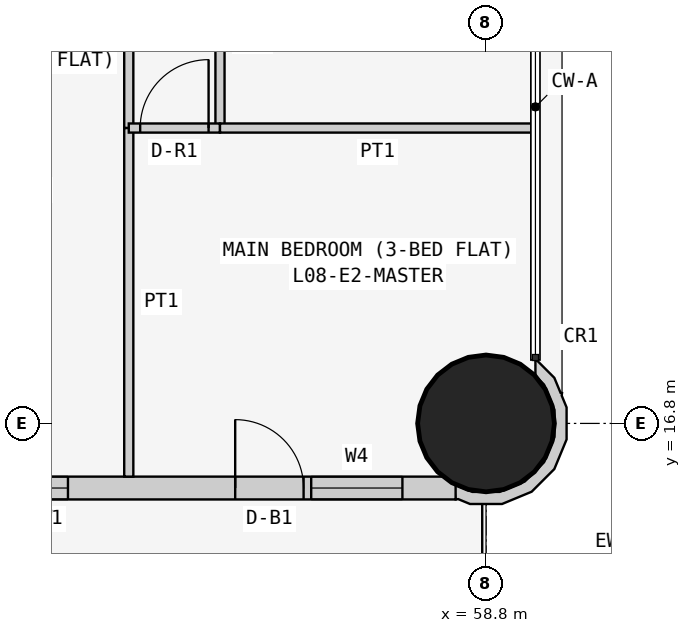
"""IFC4 building model, lengths in metres.
Left out: names, types, materials, properties, quantities, classifications, styles, units other than length and angle.
Written with IfcOpenShell. Run it as: python <this file> out.ifc"""

import sys

from ifc_helpers import new_model, si_unit, direction, frame, frame_2d, origin, origin_2d, place, context, subcontext, project, spatial, polyline, rectangle, circle, outline, extrude, element, fill, save


model = new_model("IFC4")
c1 = context("Model", 3, precision=1e-05, world=origin(), true_north=direction((0.0, 1.0)))
c2 = subcontext(c1, "Body", "Model", "MODEL_VIEW")
j1 = project(units=[si_unit("LENGTHUNIT", "METRE"), si_unit("PLANEANGLEUNIT", "RADIAN")], contexts=[c1])
p1 = place(None, origin())
s1 = spatial("IfcSite", under=j1, at=p1, CompositionType="ELEMENT")
p2 = place(p1, origin())
s2 = spatial("IfcBuilding", under=s1, at=p2, CompositionType="ELEMENT")
p3 = place(p2, frame((0.0, 0.0, 38.1)))
s3 = spatial("IfcBuildingStorey", under=s2, at=p3, CompositionType="ELEMENT", Elevation=38.1)
p4 = place(p3, frame((58.8, 16.8, 0.0), z_axis=(0.0, 0.0, 1.0), x_axis=(1.0, 0.0, 0.0)))
e1 = element("IfcColumn", 1, at=p4, inside=s3, PredefinedType="COLUMN", context=c2, shape_type="SweptSolid", body=[
    extrude(circle(Radius=0.9, at=origin_2d()), origin(), (0.0, 0.0, 1.0), 3.6),
])
p5 = place(p3, frame((43.0, 15.95, 0.0), z_axis=(0.0, 0.0, 1.0), x_axis=(1.0, 0.0, 0.0)))
e2 = element("IfcWall", 2, at=p5, inside=s3, PredefinedType="SOLIDWALL", context=c2, shape_type="SweptSolid", body=[
    extrude(rectangle(XDim=15.4, YDim=0.3, at=frame_2d((7.7, 0.0))), origin(), (0.0, 0.0, 1.0), 3.45),
])
p6 = place(p5, frame((1.2, 0.0, 0.9)))
e3 = element("IfcOpeningElement", 3, at=p6, cuts=e2, PredefinedType="OPENING", context=c2, shape_type="SweptSolid", body=[
    extrude(rectangle(XDim=1.8, YDim=1.5, at=frame_2d((0.9, 0.75))), frame((0.0, 0.16, 0.0), z_axis=(0.0, -1.0, 0.0), x_axis=(1.0, 0.0, 0.0)), (0.0, 0.0, 1.0), 0.32),
])
p7 = place(p5, frame((4.95, 0.0, 1.5)))
e4 = element("IfcOpeningElement", 4, at=p7, cuts=e2, PredefinedType="OPENING", context=c2, shape_type="SweptSolid", body=[
    extrude(rectangle(XDim=0.9, YDim=0.7, at=frame_2d((0.45, 0.35))), frame((0.0, 0.16, 0.0), z_axis=(0.0, -1.0, 0.0), x_axis=(1.0, 0.0, 0.0)), (0.0, 0.0, 1.0), 0.32),
])
p8 = place(p5, frame((8.5, 0.0, 0.9)))
e5 = element("IfcOpeningElement", 5, at=p8, cuts=e2, PredefinedType="OPENING", context=c2, shape_type="SweptSolid", body=[
    extrude(rectangle(XDim=1.8, YDim=1.5, at=frame_2d((0.9, 0.75))), frame((0.0, 0.16, 0.0), z_axis=(0.0, -1.0, 0.0), x_axis=(1.0, 0.0, 0.0)), (0.0, 0.0, 1.0), 0.32),
])
p9 = place(p5, frame((12.5, 0.0, 0.0)))
e6 = element("IfcOpeningElement", 6, at=p9, cuts=e2, PredefinedType="OPENING", context=c2, shape_type="SweptSolid", body=[
    extrude(rectangle(XDim=0.9, YDim=2.4, at=frame_2d((0.45, 1.2))), frame((0.0, 0.16, 0.0), z_axis=(0.0, -1.0, 0.0), x_axis=(1.0, 0.0, 0.0)), (0.0, 0.0, 1.0), 0.32),
])
p10 = place(p5, frame((13.5, 0.0, 0.9)))
e7 = element("IfcOpeningElement", 7, at=p10, cuts=e2, PredefinedType="OPENING", context=c2, shape_type="SweptSolid", body=[
    extrude(rectangle(XDim=1.2, YDim=1.5, at=frame_2d((0.6, 0.75))), frame((0.0, 0.16, 0.0), z_axis=(0.0, -1.0, 0.0), x_axis=(1.0, 0.0, 0.0)), (0.0, 0.0, 1.0), 0.32),
])
p11 = place(p3, frame((58.436, 15.89, 0.0), z_axis=(0.0, 0.0, 1.0), x_axis=(0.926129809145, -0.377204953059, 0.0)))
e8 = element("IfcWall", 8, at=p11, inside=s3, PredefinedType="SOLIDWALL", context=c2, shape_type="SweptSolid", body=[
    extrude(outline(polyline([(0.769, 1.728), (0.75, 1.723), (0.6, 1.875), (0.295, 2.004), (0.281, 1.998), (0.36, 1.803), (0.509, 1.741), (0.761, 1.486), (0.896, 1.154), (0.894, 0.795), (0.755, 0.465), (0.5, 0.213), (0.168, 0.078), (-0.1, 0.08), (0.0, -0.097), (0.03, -0.08), (0.198, -0.081), (0.589, 0.078), (0.889, 0.374), (1.052, 0.763), (1.055, 1.185), (0.896, 1.575), (0.778, 1.695), (0.769, 1.728)])), origin(), (0.0, 0.0, 1.0), 3.45),
])
p12 = place(p3, frame((54.1, 22.971, 0.0), z_axis=(0.0, 0.0, 1.0), x_axis=(0.0, -1.0, 0.0)))
e9 = element("IfcWall", 9, at=p12, inside=s3, PredefinedType="PARTITIONING", context=c2, shape_type="SweptSolid", body=[
    extrude(rectangle(XDim=2.285, YDim=0.12, at=frame_2d((1.143, 0.0))), origin(), (0.0, 0.0, 1.0), 3.45),
])
p13 = place(p3, frame((54.1, 20.686, 0.0), z_axis=(0.0, 0.0, 1.0), x_axis=(0.0, -1.0, 0.0)))
e10 = element("IfcWall", 10, at=p13, inside=s3, PredefinedType="PARTITIONING", context=c2, shape_type="SweptSolid", body=[
    extrude(rectangle(XDim=4.586, YDim=0.12, at=frame_2d((2.293, 0.0))), origin(), (0.0, 0.0, 1.0), 3.45),
])
p14 = place(p3, frame((55.3, 22.971, 0.0), z_axis=(0.0, 0.0, 1.0), x_axis=(0.0, -1.0, 0.0)))
e11 = element("IfcWall", 11, at=p14, inside=s3, PredefinedType="PARTITIONING", context=c2, shape_type="SweptSolid", body=[
    extrude(rectangle(XDim=2.285, YDim=0.12, at=frame_2d((1.143, 0.0))), origin(), (0.0, 0.0, 1.0), 3.45),
])
p15 = place(p3, frame((55.3, 20.686, 0.0), z_axis=(0.0, 0.0, 1.0), x_axis=(-1.0, 0.0, 0.0)))
e12 = element("IfcWall", 12, at=p15, inside=s3, PredefinedType="PARTITIONING", context=c2, shape_type="SweptSolid", body=[
    extrude(rectangle(XDim=1.2, YDim=0.12, at=frame_2d((0.6, 0.0))), origin(), (0.0, 0.0, 1.0), 3.45),
])
p16 = place(p15, frame((0.15, 0.0, 0.0)))
e13 = element("IfcOpeningElement", 13, at=p16, cuts=e12, PredefinedType="OPENING", context=c2, shape_type="SweptSolid", body=[
    extrude(rectangle(XDim=0.9, YDim=2.1, at=frame_2d((0.45, 1.05))), frame((0.0, 0.07, 0.0), z_axis=(0.0, -1.0, 0.0), x_axis=(1.0, 0.0, 0.0)), (0.0, 0.0, 1.0), 0.14),
])
p17 = place(p3, frame((59.45, 20.686, 0.0), z_axis=(0.0, 0.0, 1.0), x_axis=(-1.0, 0.0, 0.0)))
e14 = element("IfcWall", 14, at=p17, inside=s3, PredefinedType="PARTITIONING", context=c2, shape_type="SweptSolid", body=[
    extrude(rectangle(XDim=4.15, YDim=0.12, at=frame_2d((2.075, 0.0))), origin(), (0.0, 0.0, 1.0), 3.45),
])
p18 = place(p8, origin())
e15 = element("IfcWindow", 15, at=p18, inside=s3, PartitioningType="SINGLE_PANEL", PredefinedType="WINDOW", context=c2, shape_type="SweptSolid", body=[
    extrude(rectangle(XDim=1.8, YDim=1.5, at=frame_2d((0.9, 0.75))), frame((0.0, 0.03, 0.0), z_axis=(0.0, -1.0, 0.0), x_axis=(1.0, 0.0, 0.0)), (0.0, 0.0, 1.0), 0.06),
])
fill(e5, e15)
p19 = place(p9, origin())
e16 = element("IfcDoor", 16, at=p19, inside=s3, OperationType="SINGLE_SWING_LEFT", PredefinedType="DOOR", context=c2, shape_type="SweptSolid", body=[
    extrude(rectangle(XDim=0.9, YDim=2.4, at=frame_2d((0.45, 1.2))), frame((0.0, 0.025, 0.0), z_axis=(0.0, -1.0, 0.0), x_axis=(1.0, 0.0, 0.0)), (0.0, 0.0, 1.0), 0.05),
])
fill(e6, e16)
p20 = place(p10, origin())
e17 = element("IfcWindow", 17, at=p20, inside=s3, PartitioningType="SINGLE_PANEL", PredefinedType="WINDOW", context=c2, shape_type="SweptSolid", body=[
    extrude(rectangle(XDim=1.2, YDim=1.5, at=frame_2d((0.6, 0.75))), frame((0.0, 0.03, 0.0), z_axis=(0.0, -1.0, 0.0), x_axis=(1.0, 0.0, 0.0)), (0.0, 0.0, 1.0), 0.06),
])
fill(e7, e17)
p21 = place(p16, frame((0.9, 0.0, 0.0), z_axis=(0.0, 0.0, 1.0), x_axis=(-1.0, 0.0, 0.0)))
e18 = element("IfcDoor", 18, at=p21, inside=s3, OperationType="SINGLE_SWING_RIGHT", PredefinedType="DOOR", context=c2, shape_type="SweptSolid", body=[
    extrude(rectangle(XDim=0.9, YDim=2.1, at=frame_2d((0.45, 1.05))), frame((0.0, 0.025, 0.0), z_axis=(0.0, -1.0, 0.0), x_axis=(1.0, 0.0, 0.0)), (0.0, 0.0, 1.0), 0.05),
])
fill(e13, e18)
save(model, sys.argv[1])
